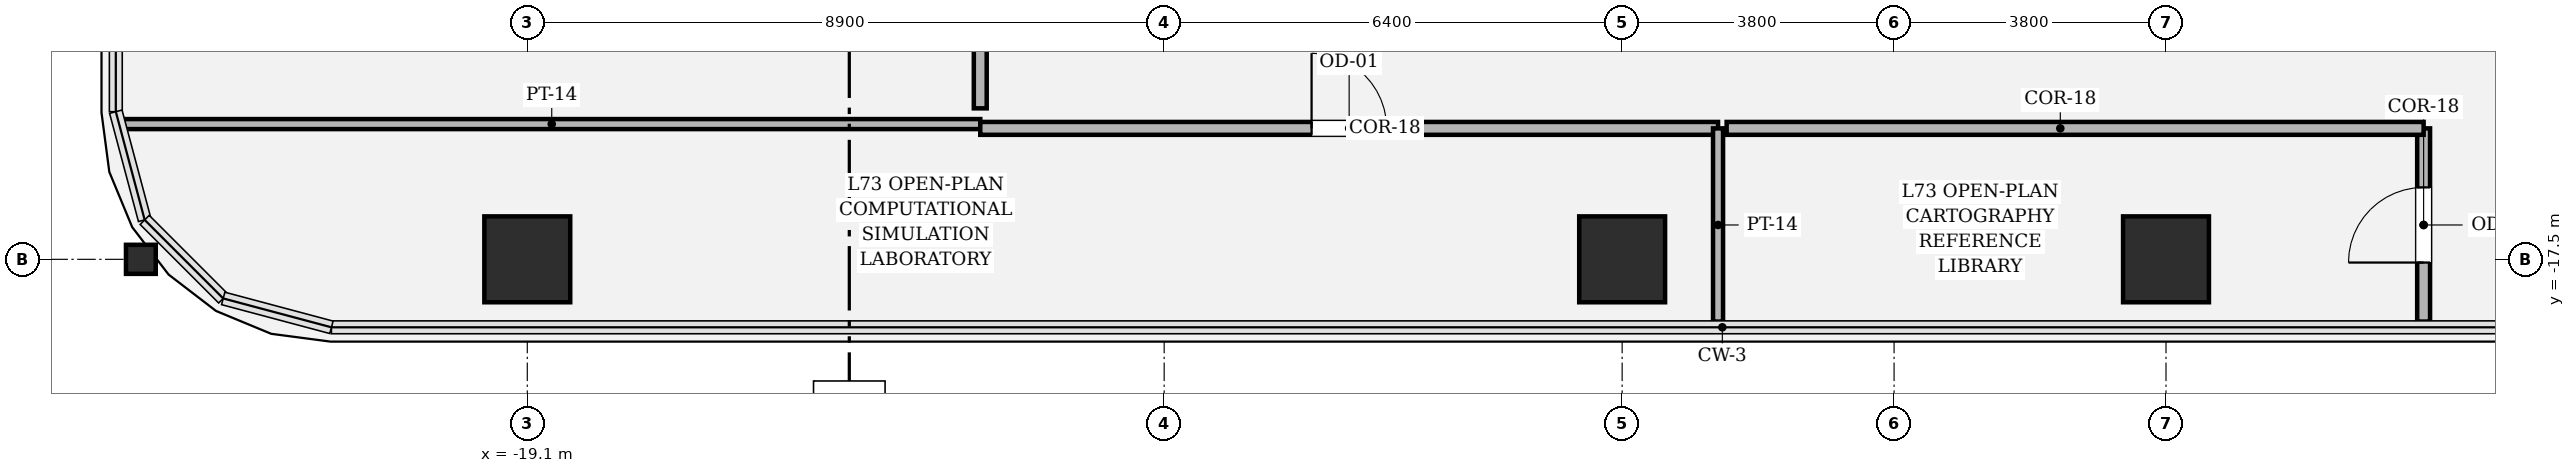
"""IFC4 building model, lengths in metres.
Left out: names, types, materials, properties, quantities, classifications, styles, units other than length and angle.
Written with IfcOpenShell. Run it as: python <this file> out.ifc"""

import sys

from ifc_helpers import new_model, si_unit, direction, frame, frame_2d, origin, origin_2d, place, context, subcontext, project, spatial, rectangle, hollow_rectangle, i_section, extrude, element, fill, save


model = new_model("IFC4")
c1 = context("Model", 3, precision=1e-05, world=origin(), true_north=direction((0.0, 1.0)))
c2 = subcontext(c1, "Body", "Model", "MODEL_VIEW")
j1 = project(units=[si_unit("LENGTHUNIT", "METRE"), si_unit("PLANEANGLEUNIT", "RADIAN")], contexts=[c1])
p1 = place(None, origin())
s1 = spatial("IfcSite", under=j1, at=p1, CompositionType="ELEMENT")
p2 = place(p1, origin())
s2 = spatial("IfcBuilding", under=s1, at=p2, CompositionType="ELEMENT")
p3 = place(p2, frame((0.0, 0.0, 309.0)))
s3 = spatial("IfcBuildingStorey", under=s2, at=p3, CompositionType="ELEMENT", Elevation=309.0)
for number, where, z_axis, x_axis in (
    (1, (-19.1, -17.5, 0.0), (0.0, 0.0, 1.0), (1.0, 0.0, 0.0)),
    (2, (-3.8, -17.5, 0.0), (0.0, 0.0, 1.0), (1.0, 0.0, 0.0)),
    (3, (3.8, -17.5, 0.0), (0.0, 0.0, 1.0), (1.0, 0.0, 0.0)),
):
    element("IfcColumn", number, at=place(p3, frame(where, z_axis=z_axis, x_axis=x_axis)), inside=s3, PredefinedType="COLUMN", context=c2, shape_type="SweptSolid", body=[
        extrude(hollow_rectangle(XDim=1.2, YDim=1.2, WallThickness=0.035, at=origin_2d()), origin(), (0.0, 0.0, 1.0), 4.2),
    ])
p4 = place(p3, frame((-24.5, -17.5, 0.0), z_axis=(0.0, 0.0, 1.0), x_axis=(0.0, 1.0, 0.0)))
e4 = element("IfcColumn", 4, at=p4, inside=s3, PredefinedType="COLUMN", context=c2, shape_type="SweptSolid", body=[
    extrude(i_section(OverallWidth=0.406, OverallDepth=0.416, WebThickness=0.029, FlangeThickness=0.048, FilletRadius=0.018, at=origin_2d()), origin(), (0.0, 0.0, 1.0), 4.198),
])
p5 = place(p3, frame((-24.747, -15.61, 0.0), z_axis=(0.0, 0.0, 1.0), x_axis=(1.0, 0.0, 0.0)))
e5 = element("IfcWall", 5, at=p5, inside=s3, PredefinedType="PARTITIONING", context=c2, shape_type="SweptSolid", body=[
    extrude(rectangle(XDim=11.977, YDim=0.14, at=frame_2d((5.988, 0.0))), origin(), (0.0, 0.0, 1.0), 2.714),
])
p6 = place(p3, frame((-12.77, -15.67, 0.0), z_axis=(0.0, 0.0, 1.0), x_axis=(1.0, 0.0, 0.0)))
e6 = element("IfcWall", 6, at=p6, inside=s3, PredefinedType="PARTITIONING", context=c2, shape_type="SweptSolid", body=[
    extrude(rectangle(XDim=10.31, YDim=0.18, at=frame_2d((5.155, 0.0))), origin(), (0.0, 0.0, 1.0), 3.394),
])
p7 = place(p6, frame((4.63, 0.0, 0.0)))
e7 = element("IfcOpeningElement", 7, at=p7, cuts=e6, PredefinedType="OPENING", context=c2, shape_type="SweptSolid", body=[
    extrude(rectangle(XDim=1.05, YDim=2.2, at=frame_2d((0.525, 1.1))), frame((0.0, 0.1, 0.0), z_axis=(0.0, -1.0, 0.0), x_axis=(1.0, 0.0, 0.0)), (0.0, 0.0, 1.0), 0.2),
])
p8 = place(p3, frame((-2.46, -15.67, 0.0), z_axis=(0.0, 0.0, 1.0), x_axis=(0.0, -1.0, 0.0)))
e8 = element("IfcWall", 8, at=p8, inside=s3, PredefinedType="PARTITIONING", context=c2, shape_type="SweptSolid", body=[
    extrude(rectangle(XDim=2.7, YDim=0.14, at=frame_2d((1.35, 0.0))), origin(), (0.0, 0.0, 1.0), 3.394),
])
p9 = place(p3, frame((7.4, -15.67, 0.0), z_axis=(0.0, 0.0, 1.0), x_axis=(0.0, -1.0, 0.0)))
e9 = element("IfcWall", 9, at=p9, inside=s3, PredefinedType="PARTITIONING", context=c2, shape_type="SweptSolid", body=[
    extrude(rectangle(XDim=2.7, YDim=0.18, at=frame_2d((1.35, 0.0))), origin(), (0.0, 0.0, 1.0), 3.394),
])
p10 = place(p9, frame((0.825, 0.0, 0.0)))
e10 = element("IfcOpeningElement", 10, at=p10, cuts=e9, PredefinedType="OPENING", context=c2, shape_type="SweptSolid", body=[
    extrude(rectangle(XDim=1.05, YDim=2.2, at=frame_2d((0.525, 1.1))), frame((0.0, 0.1, 0.0), z_axis=(0.0, -1.0, 0.0), x_axis=(1.0, 0.0, 0.0)), (0.0, 0.0, 1.0), 0.2),
])
p11 = place(p3, frame((-2.34, -15.67, 0.0), z_axis=(0.0, 0.0, 1.0), x_axis=(1.0, 0.0, 0.0)))
e11 = element("IfcWall", 11, at=p11, inside=s3, PredefinedType="PARTITIONING", context=c2, shape_type="SweptSolid", body=[
    extrude(rectangle(XDim=9.74, YDim=0.18, at=frame_2d((4.87, 0.0))), origin(), (0.0, 0.0, 1.0), 3.394),
])
p12 = place(p3, frame((-12.77, -13.38, 0.0), z_axis=(0.0, 0.0, 1.0), x_axis=(0.0, -1.0, 0.0)))
e12 = element("IfcWall", 12, at=p12, inside=s3, PredefinedType="PARTITIONING", context=c2, shape_type="SweptSolid", body=[
    extrude(rectangle(XDim=2.01, YDim=0.18, at=frame_2d((1.005, 0.0))), origin(), (0.0, 0.0, 1.0), 3.634),
])
p13 = place(p7, origin())
e13 = element("IfcDoor", 13, at=p13, inside=s3, OperationType="SINGLE_SWING_LEFT", PredefinedType="DOOR", context=c2, shape_type="SweptSolid", body=[
    extrude(rectangle(XDim=1.05, YDim=2.2, at=frame_2d((0.525, 1.1))), frame((0.0, 0.025, 0.0), z_axis=(0.0, -1.0, 0.0), x_axis=(1.0, 0.0, 0.0)), (0.0, 0.0, 1.0), 0.05),
])
fill(e7, e13)
p14 = place(p10, origin())
e14 = element("IfcDoor", 14, at=p14, inside=s3, OperationType="SINGLE_SWING_RIGHT", PredefinedType="DOOR", context=c2, shape_type="SweptSolid", body=[
    extrude(rectangle(XDim=1.05, YDim=2.2, at=frame_2d((0.525, 1.1))), frame((0.0, 0.025, 0.0), z_axis=(0.0, -1.0, 0.0), x_axis=(1.0, 0.0, 0.0)), (0.0, 0.0, 1.0), 0.05),
])
fill(e10, e14)
save(model, sys.argv[1])
